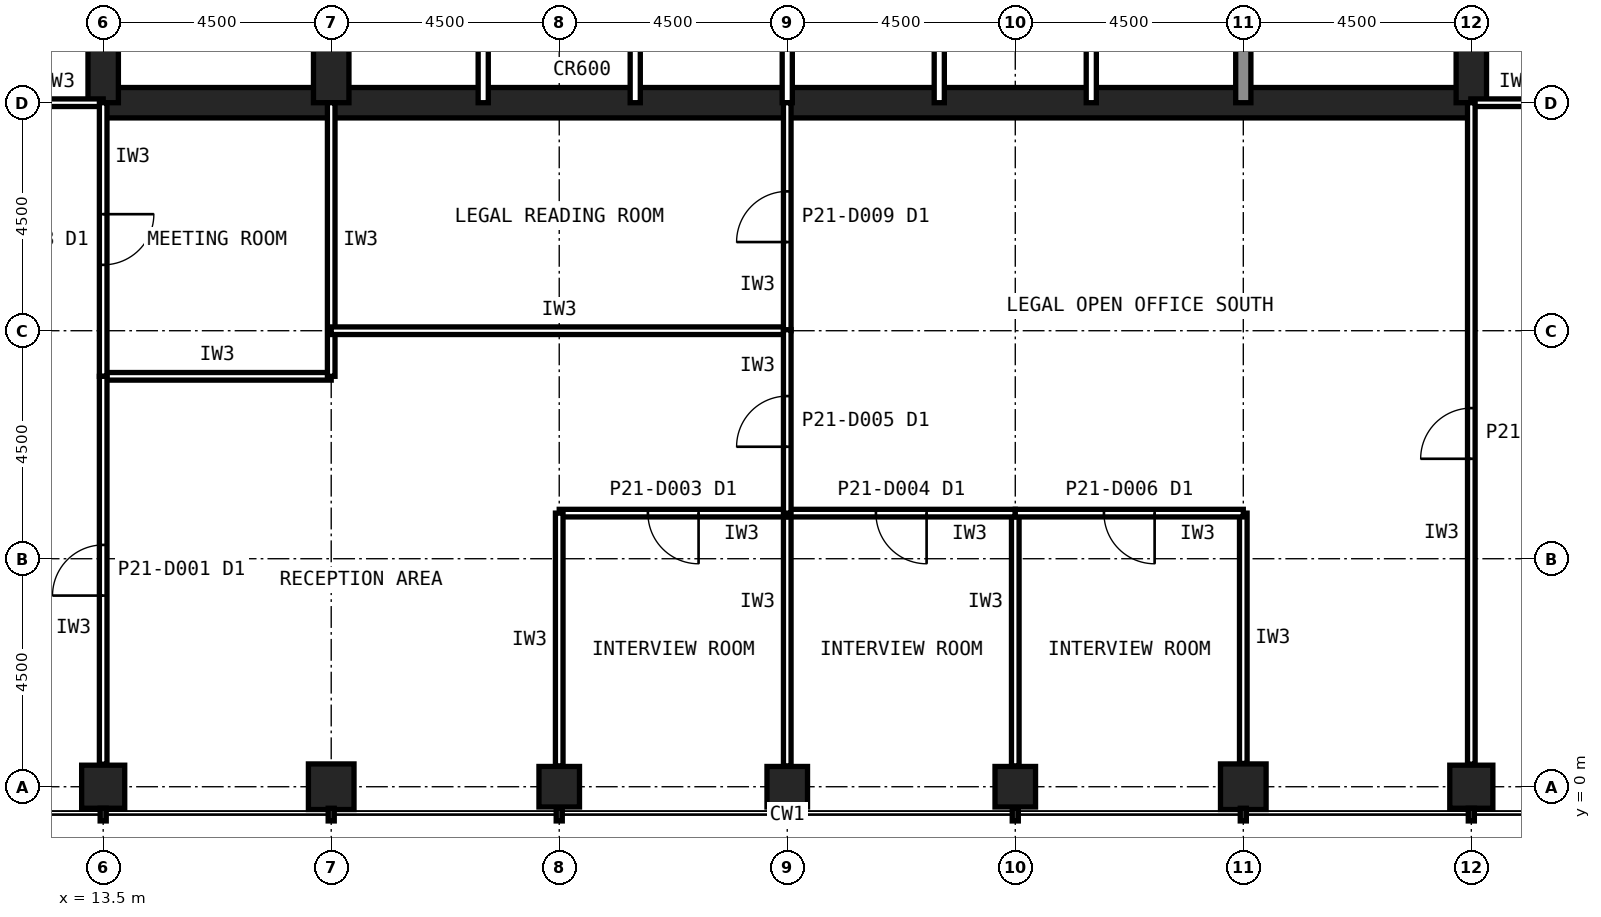
"""IFC4 building model, lengths in metres.
Left out: names, types, materials, properties, quantities, classifications, styles, units other than length and angle.
Written with IfcOpenShell. Run it as: python <this file> out.ifc"""

import sys

from ifc_helpers import new_model, si_unit, direction, frame, frame_2d, origin, origin_2d, place, context, subcontext, project, spatial, rectangle, hollow_rectangle, extrude, element, fill, save


model = new_model("IFC4")
c1 = context("Model", 3, precision=1e-05, world=origin(), true_north=direction((0.0, 1.0)))
c2 = subcontext(c1, "Body", "Model", "MODEL_VIEW")
j1 = project(units=[si_unit("LENGTHUNIT", "METRE"), si_unit("PLANEANGLEUNIT", "RADIAN")], contexts=[c1])
p1 = place(None, origin())
s1 = spatial("IfcSite", under=j1, at=p1, CompositionType="ELEMENT")
p2 = place(p1, origin())
s2 = spatial("IfcBuilding", under=s1, at=p2, CompositionType="ELEMENT")
p3 = place(p2, frame((0.0, 0.0, 87.8)))
s3 = spatial("IfcBuildingStorey", under=s2, at=p3, CompositionType="ELEMENT", Elevation=87.8)
p4 = place(p3, frame((13.5, 0.0, 0.0), z_axis=(0.0, 0.0, 1.0), x_axis=(1.0, 0.0, 0.0)))
e1 = element("IfcColumn", 1, at=p4, inside=s3, PredefinedType="COLUMN", context=c2, shape_type="SweptSolid", body=[
    extrude(hollow_rectangle(XDim=0.85, YDim=0.85, WallThickness=0.05, at=origin_2d()), origin(), (0.0, 0.0, 1.0), 4.2),
])
p5 = place(p3, frame((18.0, 0.0, 0.0), z_axis=(0.0, 0.0, 1.0), x_axis=(1.0, 0.0, 0.0)))
e2 = element("IfcColumn", 2, at=p5, inside=s3, PredefinedType="COLUMN", context=c2, shape_type="SweptSolid", body=[
    extrude(hollow_rectangle(XDim=0.9, YDim=0.9, WallThickness=0.063, at=origin_2d()), origin(), (0.0, 0.0, 1.0), 4.2),
])
for number, where, z_axis, x_axis in (
    (3, (22.5, 0.0, 0.0), (0.0, 0.0, 1.0), (1.0, 0.0, 0.0)),
    (4, (27.0, 0.0, 0.0), (0.0, 0.0, 1.0), (1.0, 0.0, 0.0)),
    (5, (31.5, 0.0, 0.0), (0.0, 0.0, 1.0), (1.0, 0.0, 0.0)),
):
    element("IfcColumn", number, at=place(p3, frame(where, z_axis=z_axis, x_axis=x_axis)), inside=s3, PredefinedType="COLUMN", context=c2, shape_type="SweptSolid", body=[
        extrude(hollow_rectangle(XDim=0.8, YDim=0.8, WallThickness=0.045, at=origin_2d()), origin(), (0.0, 0.0, 1.0), 4.2),
    ])
p6 = place(p3, frame((36.0, 0.0, 0.0), z_axis=(0.0, 0.0, 1.0), x_axis=(1.0, 0.0, 0.0)))
e6 = element("IfcColumn", 6, at=p6, inside=s3, PredefinedType="COLUMN", context=c2, shape_type="SweptSolid", body=[
    extrude(hollow_rectangle(XDim=0.9, YDim=0.9, WallThickness=0.063, at=origin_2d()), origin(), (0.0, 0.0, 1.0), 4.2),
])
p7 = place(p3, frame((40.5, 0.0, 0.0), z_axis=(0.0, 0.0, 1.0), x_axis=(1.0, 0.0, 0.0)))
e7 = element("IfcColumn", 7, at=p7, inside=s3, PredefinedType="COLUMN", context=c2, shape_type="SweptSolid", body=[
    extrude(hollow_rectangle(XDim=0.85, YDim=0.85, WallThickness=0.05, at=origin_2d()), origin(), (0.0, 0.0, 1.0), 4.2),
])
p8 = place(p3, frame((13.5, 13.5, 0.0), z_axis=(0.0, 0.0, 1.0), x_axis=(1.0, 0.0, 0.0)))
e8 = element("IfcWall", 8, at=p8, inside=s3, PredefinedType="SHEAR", context=c2, shape_type="SweptSolid", body=[
    extrude(rectangle(XDim=27.0, YDim=0.6, at=frame_2d((13.5, 0.0))), origin(), (0.0, 0.0, 1.0), 4.2),
])
p9 = place(p3, frame((40.5, 13.5, 0.0), z_axis=(0.0, 0.0, 1.0), x_axis=(0.0, 1.0, 0.0)))
e9 = element("IfcWall", 9, at=p9, inside=s3, PredefinedType="SHEAR", context=c2, shape_type="SweptSolid", body=[
    extrude(rectangle(XDim=27.0, YDim=0.6, at=frame_2d((13.5, 0.0))), origin(), (0.0, 0.0, 1.0), 4.2),
])
p10 = place(p9, frame((5.85, 0.0, 0.0)))
e10 = element("IfcOpeningElement", 10, at=p10, cuts=e9, PredefinedType="OPENING", context=c2, shape_type="SweptSolid", body=[
    extrude(rectangle(XDim=1.8, YDim=2.1, at=frame_2d((0.9, 1.05))), frame((0.0, 0.31, 0.0), z_axis=(0.0, -1.0, 0.0), x_axis=(1.0, 0.0, 0.0)), (0.0, 0.0, 1.0), 0.62),
])
p11 = place(p9, frame((19.65, 0.0, 0.0)))
e11 = element("IfcOpeningElement", 11, at=p11, cuts=e9, PredefinedType="OPENING", context=c2, shape_type="SweptSolid", body=[
    extrude(rectangle(XDim=1.2, YDim=2.1, at=frame_2d((0.6, 1.05))), frame((0.0, 0.31, 0.0), z_axis=(0.0, -1.0, 0.0), x_axis=(1.0, 0.0, 0.0)), (0.0, 0.0, 1.0), 0.62),
])
p12 = place(p3, frame((13.5, 40.5, 0.0), z_axis=(0.0, 0.0, 1.0), x_axis=(0.0, -1.0, 0.0)))
e12 = element("IfcWall", 12, at=p12, inside=s3, PredefinedType="SHEAR", context=c2, shape_type="SweptSolid", body=[
    extrude(rectangle(XDim=27.0, YDim=0.6, at=frame_2d((13.5, 0.0))), origin(), (0.0, 0.0, 1.0), 4.2),
])
p13 = place(p12, frame((19.65, 0.0, 0.0)))
e13 = element("IfcOpeningElement", 13, at=p13, cuts=e12, PredefinedType="OPENING", context=c2, shape_type="SweptSolid", body=[
    extrude(rectangle(XDim=1.2, YDim=2.1, at=frame_2d((0.6, 1.05))), frame((0.0, 0.31, 0.0), z_axis=(0.0, -1.0, 0.0), x_axis=(1.0, 0.0, 0.0)), (0.0, 0.0, 1.0), 0.62),
])
p14 = place(p12, frame((5.85, 0.0, 0.0)))
e14 = element("IfcOpeningElement", 14, at=p14, cuts=e12, PredefinedType="OPENING", context=c2, shape_type="SweptSolid", body=[
    extrude(rectangle(XDim=1.8, YDim=2.1, at=frame_2d((0.9, 1.05))), frame((0.0, 0.31, 0.0), z_axis=(0.0, -1.0, 0.0), x_axis=(1.0, 0.0, 0.0)), (0.0, 0.0, 1.0), 0.62),
])
p15 = place(p3, frame((18.0, 13.5, 0.0), z_axis=(0.0, 0.0, 1.0), x_axis=(0.0, 1.0, 0.0)))
e15 = element("IfcWall", 15, at=p15, inside=s3, PredefinedType="SHEAR", context=c2, shape_type="SweptSolid", body=[
    extrude(rectangle(XDim=18.0, YDim=0.7, at=frame_2d((9.0, 0.0))), origin(), (0.0, 0.0, 1.0), 4.2),
])
p16 = place(p3, frame((36.0, 13.5, 0.0), z_axis=(0.0, 0.0, 1.0), x_axis=(0.0, 1.0, 0.0)))
e16 = element("IfcWall", 16, at=p16, inside=s3, PredefinedType="SOLIDWALL", context=c2, shape_type="SweptSolid", body=[
    extrude(rectangle(XDim=4.5, YDim=0.3, at=frame_2d((2.25, 0.0))), origin(), (0.0, 0.0, 1.0), 4.04),
])
for number, where, z_axis, x_axis in (
    (17, (21.0, 13.5, 0.0), (0.0, 0.0, 1.0), (0.0, 1.0, 0.0)),
    (18, (24.0, 13.5, 0.0), (0.0, 0.0, 1.0), (0.0, 1.0, 0.0)),
    (19, (27.0, 13.5, 0.0), (0.0, 0.0, 1.0), (0.0, 1.0, 0.0)),
    (20, (30.0, 13.5, 0.0), (0.0, 0.0, 1.0), (0.0, 1.0, 0.0)),
    (21, (33.0, 13.5, 0.0), (0.0, 0.0, 1.0), (0.0, 1.0, 0.0)),
):
    element("IfcWall", number, at=place(p3, frame(where, z_axis=z_axis, x_axis=x_axis)), inside=s3, PredefinedType="PARTITIONING", context=c2, shape_type="SweptSolid", body=[
        extrude(rectangle(XDim=4.5, YDim=0.2, at=frame_2d((2.25, 0.0))), origin(), (0.0, 0.0, 1.0), 4.04),
    ])
p17 = place(p3, frame((40.49, 13.5, 0.0), z_axis=(0.0, 0.0, 1.0), x_axis=(1.0, 0.0, 0.0)))
e22 = element("IfcWall", 22, at=p17, inside=s3, PredefinedType="PARTITIONING", context=c2, shape_type="SweptSolid", body=[
    extrude(rectangle(XDim=1.81, YDim=0.15, at=frame_2d((0.905, 0.0))), origin(), (0.0, 0.0, 1.0), 3.189),
])
p18 = place(p3, frame((11.7, 13.5, 0.0), z_axis=(0.0, 0.0, 1.0), x_axis=(1.0, 0.0, 0.0)))
e23 = element("IfcWall", 23, at=p18, inside=s3, PredefinedType="PARTITIONING", context=c2, shape_type="SweptSolid", body=[
    extrude(rectangle(XDim=1.8, YDim=0.15, at=frame_2d((0.9, 0.0))), origin(), (0.0, 0.0, 1.0), 3.189),
])
p19 = place(p3, frame((27.0, 0.41, 0.0), z_axis=(0.0, 0.0, 1.0), x_axis=(0.0, 1.0, 0.0)))
e24 = element("IfcWall", 24, at=p19, inside=s3, PredefinedType="PARTITIONING", context=c2, shape_type="SweptSolid", body=[
    extrude(rectangle(XDim=4.99, YDim=0.15, at=frame_2d((2.495, 0.0))), origin(), (0.0, 0.0, 1.0), 3.189),
])
p20 = place(p3, frame((27.0, 5.4, 0.0), z_axis=(0.0, 0.0, 1.0), x_axis=(-1.0, 0.0, 0.0)))
e25 = element("IfcWall", 25, at=p20, inside=s3, PredefinedType="PARTITIONING", context=c2, shape_type="SweptSolid", body=[
    extrude(rectangle(XDim=4.5, YDim=0.15, at=frame_2d((2.25, 0.0))), origin(), (0.0, 0.0, 1.0), 4.04),
])
p21 = place(p20, frame((1.75, 0.0, 0.0)))
e26 = element("IfcOpeningElement", 26, at=p21, cuts=e25, PredefinedType="OPENING", context=c2, shape_type="SweptSolid", body=[
    extrude(rectangle(XDim=1.0, YDim=2.1, at=frame_2d((0.5, 1.05))), frame((0.0, 0.085, 0.0), z_axis=(0.0, -1.0, 0.0), x_axis=(1.0, 0.0, 0.0)), (0.0, 0.0, 1.0), 0.17),
])
for number, where, z_axis, x_axis in (
    (27, (22.5, 5.4, 0.0), (0.0, 0.0, 1.0), (0.0, -1.0, 0.0)),
    (28, (31.5, 0.41, 0.0), (0.0, 0.0, 1.0), (0.0, 1.0, 0.0)),
):
    element("IfcWall", number, at=place(p3, frame(where, z_axis=z_axis, x_axis=x_axis)), inside=s3, PredefinedType="PARTITIONING", context=c2, shape_type="SweptSolid", body=[
        extrude(rectangle(XDim=4.99, YDim=0.15, at=frame_2d((2.495, 0.0))), origin(), (0.0, 0.0, 1.0), 3.189),
    ])
p22 = place(p3, frame((31.5, 5.4, 0.0), z_axis=(0.0, 0.0, 1.0), x_axis=(-1.0, 0.0, 0.0)))
e29 = element("IfcWall", 29, at=p22, inside=s3, PredefinedType="PARTITIONING", context=c2, shape_type="SweptSolid", body=[
    extrude(rectangle(XDim=4.5, YDim=0.15, at=frame_2d((2.25, 0.0))), origin(), (0.0, 0.0, 1.0), 4.04),
])
p23 = place(p22, frame((1.75, 0.0, 0.0)))
e30 = element("IfcOpeningElement", 30, at=p23, cuts=e29, PredefinedType="OPENING", context=c2, shape_type="SweptSolid", body=[
    extrude(rectangle(XDim=1.0, YDim=2.1, at=frame_2d((0.5, 1.05))), frame((0.0, 0.085, 0.0), z_axis=(0.0, -1.0, 0.0), x_axis=(1.0, 0.0, 0.0)), (0.0, 0.0, 1.0), 0.17),
])
p24 = place(p3, frame((36.0, 0.46, 0.0), z_axis=(0.0, 0.0, 1.0), x_axis=(0.0, 1.0, 0.0)))
e31 = element("IfcWall", 31, at=p24, inside=s3, PredefinedType="PARTITIONING", context=c2, shape_type="SweptSolid", body=[
    extrude(rectangle(XDim=4.94, YDim=0.15, at=frame_2d((2.47, 0.0))), origin(), (0.0, 0.0, 1.0), 3.189),
])
p25 = place(p3, frame((36.0, 5.4, 0.0), z_axis=(0.0, 0.0, 1.0), x_axis=(-1.0, 0.0, 0.0)))
e32 = element("IfcWall", 32, at=p25, inside=s3, PredefinedType="PARTITIONING", context=c2, shape_type="SweptSolid", body=[
    extrude(rectangle(XDim=4.5, YDim=0.15, at=frame_2d((2.25, 0.0))), origin(), (0.0, 0.0, 1.0), 4.04),
])
p26 = place(p25, frame((1.75, 0.0, 0.0)))
e33 = element("IfcOpeningElement", 33, at=p26, cuts=e32, PredefinedType="OPENING", context=c2, shape_type="SweptSolid", body=[
    extrude(rectangle(XDim=1.0, YDim=2.1, at=frame_2d((0.5, 1.05))), frame((0.0, 0.085, 0.0), z_axis=(0.0, -1.0, 0.0), x_axis=(1.0, 0.0, 0.0)), (0.0, 0.0, 1.0), 0.17),
])
p27 = place(p3, frame((13.5, 8.1, 0.0), z_axis=(0.0, 0.0, 1.0), x_axis=(1.0, 0.0, 0.0)))
e34 = element("IfcWall", 34, at=p27, inside=s3, PredefinedType="PARTITIONING", context=c2, shape_type="SweptSolid", body=[
    extrude(rectangle(XDim=4.5, YDim=0.15, at=frame_2d((2.25, 0.0))), origin(), (0.0, 0.0, 1.0), 4.04),
])
p28 = place(p3, frame((18.0, 8.1, 0.0), z_axis=(0.0, 0.0, 1.0), x_axis=(0.0, 1.0, 0.0)))
e35 = element("IfcWall", 35, at=p28, inside=s3, PredefinedType="PARTITIONING", context=c2, shape_type="SweptSolid", body=[
    extrude(rectangle(XDim=5.4, YDim=0.15, at=frame_2d((2.7, 0.0))), origin(), (0.0, 0.0, 1.0), 3.189),
])
p29 = place(p3, frame((13.5, 13.5, 0.0), z_axis=(0.0, 0.0, 1.0), x_axis=(0.0, -1.0, 0.0)))
e36 = element("IfcWall", 36, at=p29, inside=s3, PredefinedType="PARTITIONING", context=c2, shape_type="SweptSolid", body=[
    extrude(rectangle(XDim=5.4, YDim=0.15, at=frame_2d((2.7, 0.0))), origin(), (0.0, 0.0, 1.0), 3.189),
])
p30 = place(p29, frame((2.2, 0.0, 0.0)))
e37 = element("IfcOpeningElement", 37, at=p30, cuts=e36, PredefinedType="OPENING", context=c2, shape_type="SweptSolid", body=[
    extrude(rectangle(XDim=1.0, YDim=2.1, at=frame_2d((0.5, 1.05))), frame((0.0, 0.085, 0.0), z_axis=(0.0, -1.0, 0.0), x_axis=(1.0, 0.0, 0.0)), (0.0, 0.0, 1.0), 0.17),
])
p31 = place(p3, frame((18.0, 9.0, 0.0), z_axis=(0.0, 0.0, 1.0), x_axis=(1.0, 0.0, 0.0)))
e38 = element("IfcWall", 38, at=p31, inside=s3, PredefinedType="PARTITIONING", context=c2, shape_type="SweptSolid", body=[
    extrude(rectangle(XDim=9.0, YDim=0.15, at=frame_2d((4.5, 0.0))), origin(), (0.0, 0.0, 1.0), 4.04),
])
p32 = place(p3, frame((27.0, 9.0, 0.0), z_axis=(0.0, 0.0, 1.0), x_axis=(0.0, 1.0, 0.0)))
e39 = element("IfcWall", 39, at=p32, inside=s3, PredefinedType="PARTITIONING", context=c2, shape_type="SweptSolid", body=[
    extrude(rectangle(XDim=4.5, YDim=0.15, at=frame_2d((2.25, 0.0))), origin(), (0.0, 0.0, 1.0), 3.189),
])
p33 = place(p32, frame((1.75, 0.0, 0.0)))
e40 = element("IfcOpeningElement", 40, at=p33, cuts=e39, PredefinedType="OPENING", context=c2, shape_type="SweptSolid", body=[
    extrude(rectangle(XDim=1.0, YDim=2.1, at=frame_2d((0.5, 1.05))), frame((0.0, 0.085, 0.0), z_axis=(0.0, -1.0, 0.0), x_axis=(1.0, 0.0, 0.0)), (0.0, 0.0, 1.0), 0.17),
])
p34 = place(p3, frame((40.5, 0.445, 0.0), z_axis=(0.0, 0.0, 1.0), x_axis=(0.0, 1.0, 0.0)))
e41 = element("IfcWall", 41, at=p34, inside=s3, PredefinedType="PARTITIONING", context=c2, shape_type="SweptSolid", body=[
    extrude(rectangle(XDim=13.055, YDim=0.15, at=frame_2d((6.527, 0.0))), origin(), (0.0, 0.0, 1.0), 3.189),
])
p35 = place(p34, frame((6.028, 0.0, 0.0)))
e42 = element("IfcOpeningElement", 42, at=p35, cuts=e41, PredefinedType="OPENING", context=c2, shape_type="SweptSolid", body=[
    extrude(rectangle(XDim=1.0, YDim=2.1, at=frame_2d((0.5, 1.05))), frame((0.0, 0.085, 0.0), z_axis=(0.0, -1.0, 0.0), x_axis=(1.0, 0.0, 0.0)), (0.0, 0.0, 1.0), 0.17),
])
p36 = place(p3, frame((27.0, 5.4, 0.0), z_axis=(0.0, 0.0, 1.0), x_axis=(0.0, 1.0, 0.0)))
e43 = element("IfcWall", 43, at=p36, inside=s3, PredefinedType="PARTITIONING", context=c2, shape_type="SweptSolid", body=[
    extrude(rectangle(XDim=3.62, YDim=0.15, at=frame_2d((1.81, 0.0))), origin(), (0.0, 0.0, 1.0), 3.189),
])
p37 = place(p36, frame((1.31, 0.0, 0.0)))
e44 = element("IfcOpeningElement", 44, at=p37, cuts=e43, PredefinedType="OPENING", context=c2, shape_type="SweptSolid", body=[
    extrude(rectangle(XDim=1.0, YDim=2.1, at=frame_2d((0.5, 1.05))), frame((0.0, 0.085, 0.0), z_axis=(0.0, -1.0, 0.0), x_axis=(1.0, 0.0, 0.0)), (0.0, 0.0, 1.0), 0.17),
])
p38 = place(p3, frame((13.5, 0.445, 0.0), z_axis=(0.0, 0.0, 1.0), x_axis=(0.0, 1.0, 0.0)))
e45 = element("IfcWall", 45, at=p38, inside=s3, PredefinedType="PARTITIONING", context=c2, shape_type="SweptSolid", body=[
    extrude(rectangle(XDim=7.655, YDim=0.15, at=frame_2d((3.828, 0.0))), origin(), (0.0, 0.0, 1.0), 3.189),
])
p39 = place(p38, frame((3.327, 0.0, 0.0)))
e46 = element("IfcOpeningElement", 46, at=p39, cuts=e45, PredefinedType="OPENING", context=c2, shape_type="SweptSolid", body=[
    extrude(rectangle(XDim=1.0, YDim=2.1, at=frame_2d((0.5, 1.05))), frame((0.0, 0.085, 0.0), z_axis=(0.0, -1.0, 0.0), x_axis=(1.0, 0.0, 0.0)), (0.0, 0.0, 1.0), 0.17),
])
p40 = place(p21, origin())
e47 = element("IfcDoor", 47, at=p40, inside=s3, OperationType="SINGLE_SWING_LEFT", PredefinedType="DOOR", context=c2, shape_type="SweptSolid", body=[
    extrude(rectangle(XDim=1.0, YDim=2.1, at=frame_2d((0.5, 1.05))), frame((0.0, 0.025, 0.0), z_axis=(0.0, -1.0, 0.0), x_axis=(1.0, 0.0, 0.0)), (0.0, 0.0, 1.0), 0.05),
])
fill(e26, e47)
p41 = place(p23, origin())
e48 = element("IfcDoor", 48, at=p41, inside=s3, OperationType="SINGLE_SWING_LEFT", PredefinedType="DOOR", context=c2, shape_type="SweptSolid", body=[
    extrude(rectangle(XDim=1.0, YDim=2.1, at=frame_2d((0.5, 1.05))), frame((0.0, 0.025, 0.0), z_axis=(0.0, -1.0, 0.0), x_axis=(1.0, 0.0, 0.0)), (0.0, 0.0, 1.0), 0.05),
])
fill(e30, e48)
p42 = place(p26, origin())
e49 = element("IfcDoor", 49, at=p42, inside=s3, OperationType="SINGLE_SWING_LEFT", PredefinedType="DOOR", context=c2, shape_type="SweptSolid", body=[
    extrude(rectangle(XDim=1.0, YDim=2.1, at=frame_2d((0.5, 1.05))), frame((0.0, 0.025, 0.0), z_axis=(0.0, -1.0, 0.0), x_axis=(1.0, 0.0, 0.0)), (0.0, 0.0, 1.0), 0.05),
])
fill(e33, e49)
p43 = place(p30, origin())
e50 = element("IfcDoor", 50, at=p43, inside=s3, OperationType="SINGLE_SWING_LEFT", PredefinedType="DOOR", context=c2, shape_type="SweptSolid", body=[
    extrude(rectangle(XDim=1.0, YDim=2.1, at=frame_2d((0.5, 1.05))), frame((0.0, 0.025, 0.0), z_axis=(0.0, -1.0, 0.0), x_axis=(1.0, 0.0, 0.0)), (0.0, 0.0, 1.0), 0.05),
])
fill(e37, e50)
p44 = place(p33, origin())
e51 = element("IfcDoor", 51, at=p44, inside=s3, OperationType="SINGLE_SWING_LEFT", PredefinedType="DOOR", context=c2, shape_type="SweptSolid", body=[
    extrude(rectangle(XDim=1.0, YDim=2.1, at=frame_2d((0.5, 1.05))), frame((0.0, 0.025, 0.0), z_axis=(0.0, -1.0, 0.0), x_axis=(1.0, 0.0, 0.0)), (0.0, 0.0, 1.0), 0.05),
])
fill(e40, e51)
p45 = place(p35, origin())
e52 = element("IfcDoor", 52, at=p45, inside=s3, OperationType="SINGLE_SWING_LEFT", PredefinedType="DOOR", context=c2, shape_type="SweptSolid", body=[
    extrude(rectangle(XDim=1.0, YDim=2.1, at=frame_2d((0.5, 1.05))), frame((0.0, 0.025, 0.0), z_axis=(0.0, -1.0, 0.0), x_axis=(1.0, 0.0, 0.0)), (0.0, 0.0, 1.0), 0.05),
])
fill(e42, e52)
p46 = place(p37, origin())
e53 = element("IfcDoor", 53, at=p46, inside=s3, OperationType="SINGLE_SWING_LEFT", PredefinedType="DOOR", context=c2, shape_type="SweptSolid", body=[
    extrude(rectangle(XDim=1.0, YDim=2.1, at=frame_2d((0.5, 1.05))), frame((0.0, 0.025, 0.0), z_axis=(0.0, -1.0, 0.0), x_axis=(1.0, 0.0, 0.0)), (0.0, 0.0, 1.0), 0.05),
])
fill(e44, e53)
p47 = place(p39, origin())
e54 = element("IfcDoor", 54, at=p47, inside=s3, OperationType="SINGLE_SWING_LEFT", PredefinedType="DOOR", context=c2, shape_type="SweptSolid", body=[
    extrude(rectangle(XDim=1.0, YDim=2.1, at=frame_2d((0.5, 1.05))), frame((0.0, 0.025, 0.0), z_axis=(0.0, -1.0, 0.0), x_axis=(1.0, 0.0, 0.0)), (0.0, 0.0, 1.0), 0.05),
])
fill(e46, e54)
save(model, sys.argv[1])
